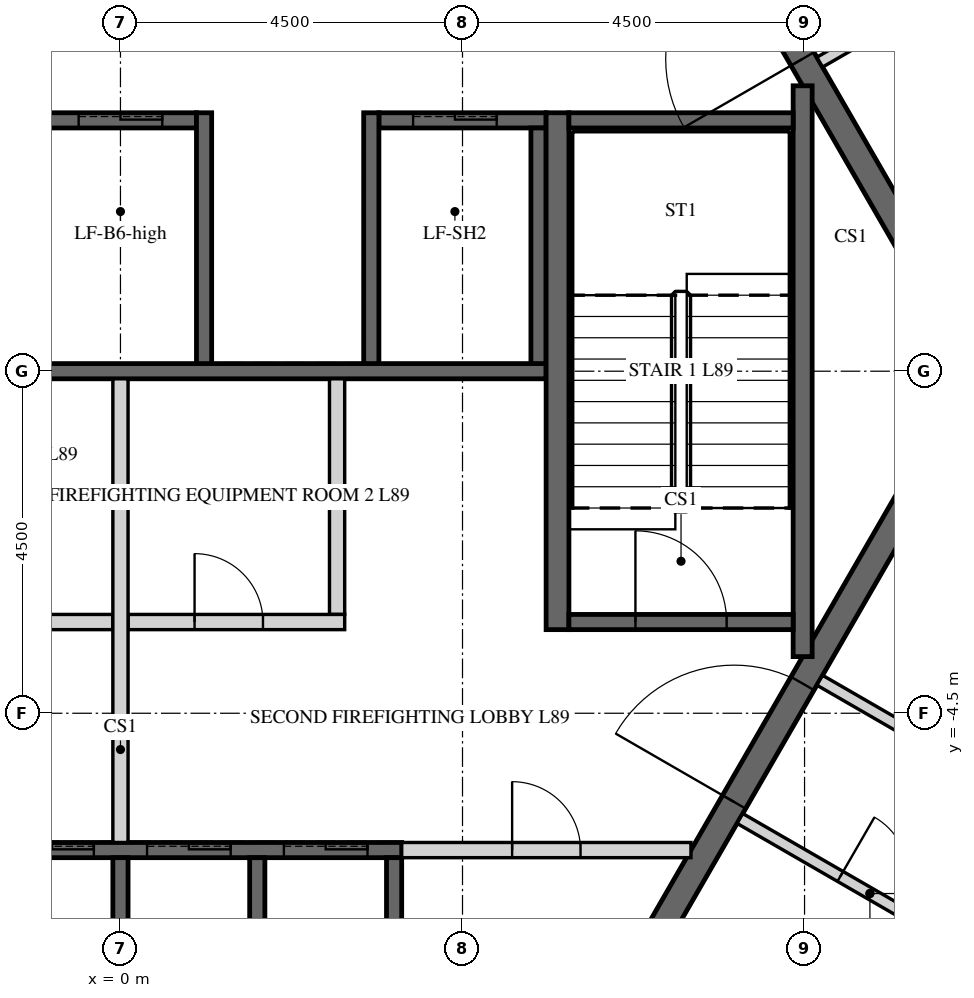
"""IFC4 building model, lengths in metres.
Left out: names, types, materials, properties, quantities, classifications, styles, units other than length and angle.
Written with IfcOpenShell. Run it as: python <this file> out.ifc"""

import sys

from ifc_helpers import new_model, si_unit, direction, frame, frame_2d, origin, place, context, subcontext, project, spatial, polyline, rectangle, outline, extrude, element, fill, save


model = new_model("IFC4")
c1 = context("Model", 3, precision=1e-05, world=origin(), true_north=direction((0.0, 1.0)))
c2 = subcontext(c1, "Body", "Model", "MODEL_VIEW")
j1 = project(units=[si_unit("LENGTHUNIT", "METRE"), si_unit("PLANEANGLEUNIT", "RADIAN")], contexts=[c1])
p1 = place(None, origin())
s1 = spatial("IfcSite", under=j1, at=p1, CompositionType="ELEMENT")
p2 = place(p1, origin())
s2 = spatial("IfcBuilding", under=s1, at=p2, CompositionType="ELEMENT")
p3 = place(p2, frame((0.0, 0.0, 369.0)))
s3 = spatial("IfcBuildingStorey", under=s2, at=p3, CompositionType="ELEMENT", Elevation=369.0)
p4 = place(p3, frame((5.673, -9.825, -0.15), z_axis=(0.0, 0.0, 1.0), x_axis=(0.499995046907, 0.866028263435, 0.0)))
e1 = element("IfcWall", 1, at=p4, inside=s3, PredefinedType="SHEAR", context=c2, shape_type="SweptSolid", body=[
    extrude(outline(polyline([(-0.101, -0.175), (11.446, -0.175), (11.244, 0.175), (0.101, 0.175), (-0.101, -0.175)])), origin(), (0.0, 0.0, 1.0), 3.9),
])
p5 = place(p4, frame((4.801, 0.0, 0.15)))
e2 = element("IfcOpeningElement", 2, at=p5, cuts=e1, PredefinedType="OPENING", context=c2, shape_type="SweptSolid", body=[
    extrude(rectangle(XDim=1.8, YDim=2.4, at=frame_2d((0.9, 1.2))), frame((0.0, 0.185, 0.0), z_axis=(0.0, -1.0, 0.0), x_axis=(1.0, 0.0, 0.0)), (0.0, 0.0, 1.0), 0.37),
])
p6 = place(p3, frame((11.345, 0.0, -0.15), z_axis=(0.0, 0.0, 1.0), x_axis=(-0.499995046907, 0.866028263435, 0.0)))
e3 = element("IfcWall", 3, at=p6, inside=s3, PredefinedType="SHEAR", context=c2, shape_type="SweptSolid", body=[
    extrude(outline(polyline([(-0.101, -0.175), (11.446, -0.175), (11.244, 0.175), (0.101, 0.175), (-0.101, -0.175)])), origin(), (0.0, 0.0, 1.0), 3.9),
])
p7 = place(p6, frame((4.744, 0.0, 0.15)))
e4 = element("IfcOpeningElement", 4, at=p7, cuts=e3, PredefinedType="OPENING", context=c2, shape_type="SweptSolid", body=[
    extrude(rectangle(XDim=1.8, YDim=2.4, at=frame_2d((0.9, 1.2))), frame((0.0, 0.185, 0.0), z_axis=(0.0, -1.0, 0.0), x_axis=(1.0, 0.0, 0.0)), (0.0, 0.0, 1.0), 0.37),
])
p8 = place(p3, frame((-5.6, 3.3, -0.25), z_axis=(0.0, 0.0, 1.0), x_axis=(1.0, 0.0, 0.0)))
e5 = element("IfcWall", 5, at=p8, inside=s3, PredefinedType="SHEAR", context=c2, shape_type="SweptSolid", body=[
    extrude(rectangle(XDim=6.6, YDim=0.2, at=frame_2d((3.3, 0.0))), origin(), (0.0, 0.0, 1.0), 3.9),
])
p9 = place(p8, frame((0.65, 0.0, 0.25)))
e6 = element("IfcOpeningElement", 6, at=p9, cuts=e5, PredefinedType="OPENING", context=c2, shape_type="SweptSolid", body=[
    extrude(rectangle(XDim=1.1, YDim=2.1, at=frame_2d((0.55, 1.05))), frame((0.0, 0.11, 0.0), z_axis=(0.0, -1.0, 0.0), x_axis=(1.0, 0.0, 0.0)), (0.0, 0.0, 1.0), 0.22),
])
p10 = place(p8, frame((2.85, 0.0, 0.25)))
e7 = element("IfcOpeningElement", 7, at=p10, cuts=e5, PredefinedType="OPENING", context=c2, shape_type="SweptSolid", body=[
    extrude(rectangle(XDim=1.1, YDim=2.1, at=frame_2d((0.55, 1.05))), frame((0.0, 0.11, 0.0), z_axis=(0.0, -1.0, 0.0), x_axis=(1.0, 0.0, 0.0)), (0.0, 0.0, 1.0), 0.22),
])
p11 = place(p8, frame((5.05, 0.0, 0.25)))
e8 = element("IfcOpeningElement", 8, at=p11, cuts=e5, PredefinedType="OPENING", context=c2, shape_type="SweptSolid", body=[
    extrude(rectangle(XDim=1.1, YDim=2.1, at=frame_2d((0.55, 1.05))), frame((0.0, 0.11, 0.0), z_axis=(0.0, -1.0, 0.0), x_axis=(1.0, 0.0, 0.0)), (0.0, 0.0, 1.0), 0.22),
])
p12 = place(p3, frame((3.4, 3.3, -0.25), z_axis=(0.0, 0.0, 1.0), x_axis=(1.0, 0.0, 0.0)))
e9 = element("IfcWall", 9, at=p12, inside=s3, PredefinedType="SHEAR", context=c2, shape_type="SweptSolid", body=[
    extrude(rectangle(XDim=2.2, YDim=0.2, at=frame_2d((1.1, 0.0))), origin(), (0.0, 0.0, 1.0), 3.9),
])
p13 = place(p12, frame((0.45, 0.0, 0.25)))
e10 = element("IfcOpeningElement", 10, at=p13, cuts=e9, PredefinedType="OPENING", context=c2, shape_type="SweptSolid", body=[
    extrude(rectangle(XDim=1.1, YDim=2.1, at=frame_2d((0.55, 1.05))), frame((0.0, 0.11, 0.0), z_axis=(0.0, -1.0, 0.0), x_axis=(1.0, 0.0, 0.0)), (0.0, 0.0, 1.0), 0.22),
])
p14 = place(p3, frame((-5.6, 0.0, -0.25), z_axis=(0.0, 0.0, 1.0), x_axis=(1.0, 0.0, 0.0)))
e11 = element("IfcWall", 11, at=p14, inside=s3, PredefinedType="SHEAR", context=c2, shape_type="SweptSolid", body=[
    extrude(rectangle(XDim=11.2, YDim=0.2, at=frame_2d((5.6, 0.0))), origin(), (0.0, 0.0, 1.0), 3.9),
])
for number, where, z_axis, x_axis in (
    (12, (1.1, 0.1, -0.25), (0.0, 0.0, 1.0), (0.0, 1.0, 0.0)),
    (13, (3.3, 0.1, -0.25), (0.0, 0.0, 1.0), (0.0, 1.0, 0.0)),
):
    element("IfcWall", number, at=place(p3, frame(where, z_axis=z_axis, x_axis=x_axis)), inside=s3, PredefinedType="SHEAR", context=c2, shape_type="SweptSolid", body=[
        extrude(rectangle(XDim=3.3, YDim=0.2, at=frame_2d((1.65, 0.0))), origin(), (0.0, 0.0, 1.0), 3.9),
    ])
p15 = place(p3, frame((5.5, 0.1, -0.25), z_axis=(0.0, 0.0, 1.0), x_axis=(0.0, 1.0, 0.0)))
e14 = element("IfcWall", 14, at=p15, inside=s3, PredefinedType="SHEAR", context=c2, shape_type="SweptSolid", body=[
    extrude(rectangle(XDim=3.1, YDim=0.2, at=frame_2d((1.55, 0.0))), origin(), (0.0, 0.0, 1.0), 3.9),
])
p16 = place(p3, frame((-5.5, -6.3, -0.25), z_axis=(0.0, 0.0, 1.0), x_axis=(1.0, 0.0, 0.0)))
e15 = element("IfcWall", 15, at=p16, inside=s3, PredefinedType="SHEAR", context=c2, shape_type="SweptSolid", body=[
    extrude(rectangle(XDim=9.2, YDim=0.2, at=frame_2d((4.6, 0.0))), origin(), (0.0, 0.0, 1.0), 3.9),
])
p17 = place(p16, frame((0.45, 0.0, 0.25)))
e16 = element("IfcOpeningElement", 16, at=p17, cuts=e15, PredefinedType="OPENING", context=c2, shape_type="SweptSolid", body=[
    extrude(rectangle(XDim=1.1, YDim=2.1, at=frame_2d((0.55, 1.05))), frame((0.0, 0.11, 0.0), z_axis=(0.0, -1.0, 0.0), x_axis=(1.0, 0.0, 0.0)), (0.0, 0.0, 1.0), 0.22),
])
p18 = place(p16, frame((2.25, 0.0, 0.25)))
e17 = element("IfcOpeningElement", 17, at=p18, cuts=e15, PredefinedType="OPENING", context=c2, shape_type="SweptSolid", body=[
    extrude(rectangle(XDim=1.1, YDim=2.1, at=frame_2d((0.55, 1.05))), frame((0.0, 0.11, 0.0), z_axis=(0.0, -1.0, 0.0), x_axis=(1.0, 0.0, 0.0)), (0.0, 0.0, 1.0), 0.22),
])
p19 = place(p16, frame((4.05, 0.0, 0.25)))
e18 = element("IfcOpeningElement", 18, at=p19, cuts=e15, PredefinedType="OPENING", context=c2, shape_type="SweptSolid", body=[
    extrude(rectangle(XDim=1.1, YDim=2.1, at=frame_2d((0.55, 1.05))), frame((0.0, 0.11, 0.0), z_axis=(0.0, -1.0, 0.0), x_axis=(1.0, 0.0, 0.0)), (0.0, 0.0, 1.0), 0.22),
])
p20 = place(p16, frame((5.85, 0.0, 0.25)))
e19 = element("IfcOpeningElement", 19, at=p20, cuts=e15, PredefinedType="OPENING", context=c2, shape_type="SweptSolid", body=[
    extrude(rectangle(XDim=1.1, YDim=2.1, at=frame_2d((0.55, 1.05))), frame((0.0, 0.11, 0.0), z_axis=(0.0, -1.0, 0.0), x_axis=(1.0, 0.0, 0.0)), (0.0, 0.0, 1.0), 0.22),
])
p21 = place(p16, frame((7.65, 0.0, 0.25)))
e20 = element("IfcOpeningElement", 20, at=p21, cuts=e15, PredefinedType="OPENING", context=c2, shape_type="SweptSolid", body=[
    extrude(rectangle(XDim=1.1, YDim=2.1, at=frame_2d((0.55, 1.05))), frame((0.0, 0.11, 0.0), z_axis=(0.0, -1.0, 0.0), x_axis=(1.0, 0.0, 0.0)), (0.0, 0.0, 1.0), 0.22),
])
for number, where, z_axis, x_axis in (
    (21, (0.0, -9.3, -0.25), (0.0, 0.0, 1.0), (0.0, 1.0, 0.0)),
    (22, (1.8, -9.3, -0.25), (0.0, 0.0, 1.0), (0.0, 1.0, 0.0)),
    (23, (3.6, -9.3, -0.25), (0.0, 0.0, 1.0), (0.0, 1.0, 0.0)),
):
    element("IfcWall", number, at=place(p3, frame(where, z_axis=z_axis, x_axis=x_axis)), inside=s3, PredefinedType="SHEAR", context=c2, shape_type="SweptSolid", body=[
        extrude(rectangle(XDim=2.9, YDim=0.2, at=frame_2d((1.45, 0.0))), origin(), (0.0, 0.0, 1.0), 3.9),
    ])
p22 = place(p3, frame((-5.6, -3.3, 0.0), z_axis=(0.0, 0.0, 1.0), x_axis=(1.0, 0.0, 0.0)))
e24 = element("IfcWall", 24, at=p22, inside=s3, PredefinedType="PARTITIONING", context=c2, shape_type="SweptSolid", body=[
    extrude(rectangle(XDim=5.5, YDim=0.2, at=frame_2d((2.75, 0.0))), origin(), (0.0, 0.0, 1.0), 3.65),
])
p23 = place(p22, frame((2.3, 0.0, 0.0)))
e25 = element("IfcOpeningElement", 25, at=p23, cuts=e24, PredefinedType="OPENING", context=c2, shape_type="SweptSolid", body=[
    extrude(rectangle(XDim=0.9, YDim=2.1, at=frame_2d((0.45, 1.05))), frame((0.0, 0.11, 0.0), z_axis=(0.0, -1.0, 0.0), x_axis=(1.0, 0.0, 0.0)), (0.0, 0.0, 1.0), 0.22),
])
p24 = place(p3, frame((0.1, -3.3, 0.0), z_axis=(0.0, 0.0, 1.0), x_axis=(1.0, 0.0, 0.0)))
e26 = element("IfcWall", 26, at=p24, inside=s3, PredefinedType="PARTITIONING", context=c2, shape_type="SweptSolid", body=[
    extrude(rectangle(XDim=2.85, YDim=0.2, at=frame_2d((1.425, 0.0))), origin(), (0.0, 0.0, 1.0), 3.65),
])
p25 = place(p24, frame((0.875, 0.0, 0.0)))
e27 = element("IfcOpeningElement", 27, at=p25, cuts=e26, PredefinedType="OPENING", context=c2, shape_type="SweptSolid", body=[
    extrude(rectangle(XDim=0.9, YDim=2.1, at=frame_2d((0.45, 1.05))), frame((0.0, 0.11, 0.0), z_axis=(0.0, -1.0, 0.0), x_axis=(1.0, 0.0, 0.0)), (0.0, 0.0, 1.0), 0.22),
])
p26 = place(p3, frame((2.85, -3.2, 0.0), z_axis=(0.0, 0.0, 1.0), x_axis=(0.0, 1.0, 0.0)))
e28 = element("IfcWall", 28, at=p26, inside=s3, PredefinedType="PARTITIONING", context=c2, shape_type="SweptSolid", body=[
    extrude(rectangle(XDim=3.1, YDim=0.2, at=frame_2d((1.55, 0.0))), origin(), (0.0, 0.0, 1.0), 3.65),
])
p27 = place(p3, frame((0.0, -6.2, 0.0), z_axis=(0.0, 0.0, 1.0), x_axis=(0.0, 1.0, 0.0)))
e29 = element("IfcWall", 29, at=p27, inside=s3, PredefinedType="PARTITIONING", context=c2, shape_type="SweptSolid", body=[
    extrude(rectangle(XDim=6.1, YDim=0.2, at=frame_2d((3.05, 0.0))), origin(), (0.0, 0.0, 1.0), 3.65),
])
p28 = place(p3, frame((3.7, -6.3, 0.0), z_axis=(0.0, 0.0, 1.0), x_axis=(1.0, 0.0, 0.0)))
e30 = element("IfcWall", 30, at=p28, inside=s3, PredefinedType="PARTITIONING", context=c2, shape_type="SweptSolid", body=[
    extrude(rectangle(XDim=3.806, YDim=0.2, at=frame_2d((1.903, 0.0))), origin(), (0.0, 0.0, 1.0), 3.65),
])
p29 = place(p28, frame((1.453, 0.0, 0.0)))
e31 = element("IfcOpeningElement", 31, at=p29, cuts=e30, PredefinedType="OPENING", context=c2, shape_type="SweptSolid", body=[
    extrude(rectangle(XDim=0.9, YDim=2.1, at=frame_2d((0.45, 1.05))), frame((0.0, 0.11, 0.0), z_axis=(0.0, -1.0, 0.0), x_axis=(1.0, 0.0, 0.0)), (0.0, 0.0, 1.0), 0.22),
])
p30 = place(p3, frame((5.75, -3.4, -0.25), z_axis=(0.0, 0.0, 1.0), x_axis=(0.0, 1.0, 0.0)))
e32 = element("IfcWall", 32, at=p30, inside=s3, PredefinedType="SHEAR", context=c2, shape_type="SweptSolid", body=[
    extrude(rectangle(XDim=6.8, YDim=0.3, at=frame_2d((3.4, 0.0))), origin(), (0.0, 0.0, 1.0), 3.9),
])
p31 = place(p3, frame((8.975, -3.755, -0.25), z_axis=(0.0, 0.0, 1.0), x_axis=(0.0, 1.0, 0.0)))
e33 = element("IfcWall", 33, at=p31, inside=s3, PredefinedType="SHEAR", context=c2, shape_type="SweptSolid", body=[
    extrude(rectangle(XDim=7.51, YDim=0.25, at=frame_2d((3.755, 0.0))), origin(), (0.0, 0.0, 1.0), 3.9),
])
p32 = place(p3, frame((5.9, 3.3, -0.25), z_axis=(0.0, 0.0, 1.0), x_axis=(1.0, 0.0, 0.0)))
e34 = element("IfcWall", 34, at=p32, inside=s3, PredefinedType="SHEAR", context=c2, shape_type="SweptSolid", body=[
    extrude(rectangle(XDim=2.95, YDim=0.2, at=frame_2d((1.475, 0.0))), origin(), (0.0, 0.0, 1.0), 3.9),
])
p33 = place(p3, frame((5.9, -3.3, -0.25), z_axis=(0.0, 0.0, 1.0), x_axis=(1.0, 0.0, 0.0)))
e35 = element("IfcWall", 35, at=p33, inside=s3, PredefinedType="SHEAR", context=c2, shape_type="SweptSolid", body=[
    extrude(rectangle(XDim=2.95, YDim=0.2, at=frame_2d((1.475, 0.0))), origin(), (0.0, 0.0, 1.0), 3.9),
])
p34 = place(p33, frame((0.875, 0.0, 0.25)))
e36 = element("IfcOpeningElement", 36, at=p34, cuts=e35, PredefinedType="OPENING", context=c2, shape_type="SweptSolid", body=[
    extrude(rectangle(XDim=1.2, YDim=2.4, at=frame_2d((0.6, 1.2))), frame((0.0, 0.11, 0.0), z_axis=(0.0, -1.0, 0.0), x_axis=(1.0, 0.0, 0.0)), (0.0, 0.0, 1.0), 0.22),
])
p35 = place(p3, frame((17.401, -1.21, 0.0), z_axis=(0.0, 0.0, 1.0), x_axis=(-0.559186729505, 0.829041736914, 0.0)))
e37 = element("IfcWall", 37, at=p35, inside=s3, PredefinedType="PARTITIONING", context=c2, shape_type="SweptSolid", body=[
    extrude(rectangle(XDim=15.243, YDim=0.15, at=frame_2d((7.621, 0.0))), origin(), (0.0, 0.0, 1.0), 2.47),
])
p36 = place(p35, frame((5.802, 0.0, 0.0)))
e38 = element("IfcOpeningElement", 38, at=p36, cuts=e37, PredefinedType="OPENING", context=c2, shape_type="SweptSolid", body=[
    extrude(rectangle(XDim=1.0, YDim=2.1, at=frame_2d((0.5, 1.05))), frame((0.0, 0.085, 0.0), z_axis=(0.0, -1.0, 0.0), x_axis=(1.0, 0.0, 0.0)), (0.0, 0.0, 1.0), 0.17),
])
p37 = place(p3, frame((9.2, 4.066, 0.0), z_axis=(0.0, 0.0, 1.0), x_axis=(0.866011447264, 0.500024172624, 0.0)))
e39 = element("IfcWall", 39, at=p37, inside=s3, PredefinedType="PARTITIONING", context=c2, shape_type="SweptSolid", body=[
    extrude(rectangle(XDim=2.055, YDim=0.15, at=frame_2d((1.027, 0.0))), origin(), (0.0, 0.0, 1.0), 2.47),
])
p38 = place(p3, frame((12.555, -6.003, 0.0), z_axis=(0.0, 0.0, 1.0), x_axis=(-0.866016658288, 0.500015147339, 0.0)))
e40 = element("IfcWall", 40, at=p38, inside=s3, PredefinedType="PARTITIONING", context=c2, shape_type="SweptSolid", body=[
    extrude(rectangle(XDim=3.875, YDim=0.15, at=frame_2d((1.938, 0.0))), origin(), (0.0, 0.0, 1.0), 2.47),
])
p39 = place(p3, frame((8.15, -5.884, 0.0), z_axis=(0.0, 0.0, 1.0), x_axis=(0.866020906874, -0.500007788796, 0.0)))
e41 = element("IfcWall", 41, at=p39, inside=s3, PredefinedType="PARTITIONING", context=c2, shape_type="SweptSolid", body=[
    extrude(rectangle(XDim=3.95, YDim=0.15, at=frame_2d((1.975, 0.0))), origin(), (0.0, 0.0, 1.0), 2.47),
])
p40 = place(p39, frame((1.525, 0.0, 0.0)))
e42 = element("IfcOpeningElement", 42, at=p40, cuts=e41, PredefinedType="OPENING", context=c2, shape_type="SweptSolid", body=[
    extrude(rectangle(XDim=0.9, YDim=2.1, at=frame_2d((0.45, 1.05))), frame((0.0, 0.085, 0.0), z_axis=(0.0, -1.0, 0.0), x_axis=(1.0, 0.0, 0.0)), (0.0, 0.0, 1.0), 0.17),
])
p41 = place(p7, origin())
e43 = element("IfcDoor", 43, at=p41, inside=s3, OperationType="DOUBLE_DOOR_SINGLE_SWING", PredefinedType="DOOR", context=c2, shape_type="SweptSolid", body=[
    extrude(rectangle(XDim=1.8, YDim=2.4, at=frame_2d((0.9, 1.2))), frame((0.0, 0.025, 0.0), z_axis=(0.0, -1.0, 0.0), x_axis=(1.0, 0.0, 0.0)), (0.0, 0.0, 1.0), 0.05),
])
fill(e4, e43)
p42 = place(p5, origin())
e44 = element("IfcDoor", 44, at=p42, inside=s3, OperationType="DOUBLE_DOOR_SINGLE_SWING", PredefinedType="DOOR", context=c2, shape_type="SweptSolid", body=[
    extrude(rectangle(XDim=1.8, YDim=2.4, at=frame_2d((0.9, 1.2))), frame((0.0, 0.025, 0.0), z_axis=(0.0, -1.0, 0.0), x_axis=(1.0, 0.0, 0.0)), (0.0, 0.0, 1.0), 0.05),
])
fill(e2, e44)
p43 = place(p25, origin())
e45 = element("IfcDoor", 45, at=p43, inside=s3, OperationType="SINGLE_SWING_LEFT", PredefinedType="DOOR", context=c2, shape_type="SweptSolid", body=[
    extrude(rectangle(XDim=0.9, YDim=2.1, at=frame_2d((0.45, 1.05))), frame((0.0, 0.025, 0.0), z_axis=(0.0, -1.0, 0.0), x_axis=(1.0, 0.0, 0.0)), (0.0, 0.0, 1.0), 0.05),
])
fill(e27, e45)
p44 = place(p29, origin())
e46 = element("IfcDoor", 46, at=p44, inside=s3, OperationType="SINGLE_SWING_LEFT", PredefinedType="DOOR", context=c2, shape_type="SweptSolid", body=[
    extrude(rectangle(XDim=0.9, YDim=2.1, at=frame_2d((0.45, 1.05))), frame((0.0, 0.025, 0.0), z_axis=(0.0, -1.0, 0.0), x_axis=(1.0, 0.0, 0.0)), (0.0, 0.0, 1.0), 0.05),
])
fill(e31, e46)
p45 = place(p34, origin())
e47 = element("IfcDoor", 47, at=p45, inside=s3, OperationType="SINGLE_SWING_LEFT", PredefinedType="DOOR", context=c2, shape_type="SweptSolid", body=[
    extrude(rectangle(XDim=1.2, YDim=2.4, at=frame_2d((0.6, 1.2))), frame((0.0, 0.025, 0.0), z_axis=(0.0, -1.0, 0.0), x_axis=(1.0, 0.0, 0.0)), (0.0, 0.0, 1.0), 0.05),
])
fill(e36, e47)
p46 = place(p11, origin())
e48 = element("IfcDoor", 48, at=p46, inside=s3, OperationType="SLIDING_TO_LEFT", PredefinedType="DOOR", context=c2, shape_type="SweptSolid", body=[
    extrude(rectangle(XDim=1.1, YDim=2.1, at=frame_2d((0.55, 1.05))), frame((0.0, 0.025, 0.0), z_axis=(0.0, -1.0, 0.0), x_axis=(1.0, 0.0, 0.0)), (0.0, 0.0, 1.0), 0.05),
])
fill(e8, e48)
p47 = place(p13, origin())
e49 = element("IfcDoor", 49, at=p47, inside=s3, OperationType="SLIDING_TO_LEFT", PredefinedType="DOOR", context=c2, shape_type="SweptSolid", body=[
    extrude(rectangle(XDim=1.1, YDim=2.1, at=frame_2d((0.55, 1.05))), frame((0.0, 0.025, 0.0), z_axis=(0.0, -1.0, 0.0), x_axis=(1.0, 0.0, 0.0)), (0.0, 0.0, 1.0), 0.05),
])
fill(e10, e49)
p48 = place(p19, origin())
e50 = element("IfcDoor", 50, at=p48, inside=s3, OperationType="SLIDING_TO_LEFT", PredefinedType="DOOR", context=c2, shape_type="SweptSolid", body=[
    extrude(rectangle(XDim=1.1, YDim=2.1, at=frame_2d((0.55, 1.05))), frame((0.0, 0.025, 0.0), z_axis=(0.0, -1.0, 0.0), x_axis=(1.0, 0.0, 0.0)), (0.0, 0.0, 1.0), 0.05),
])
fill(e18, e50)
p49 = place(p20, origin())
e51 = element("IfcDoor", 51, at=p49, inside=s3, OperationType="SLIDING_TO_LEFT", PredefinedType="DOOR", context=c2, shape_type="SweptSolid", body=[
    extrude(rectangle(XDim=1.1, YDim=2.1, at=frame_2d((0.55, 1.05))), frame((0.0, 0.025, 0.0), z_axis=(0.0, -1.0, 0.0), x_axis=(1.0, 0.0, 0.0)), (0.0, 0.0, 1.0), 0.05),
])
fill(e19, e51)
p50 = place(p21, origin())
e52 = element("IfcDoor", 52, at=p50, inside=s3, OperationType="SLIDING_TO_LEFT", PredefinedType="DOOR", context=c2, shape_type="SweptSolid", body=[
    extrude(rectangle(XDim=1.1, YDim=2.1, at=frame_2d((0.55, 1.05))), frame((0.0, 0.025, 0.0), z_axis=(0.0, -1.0, 0.0), x_axis=(1.0, 0.0, 0.0)), (0.0, 0.0, 1.0), 0.05),
])
fill(e20, e52)
p51 = place(p40, origin())
e53 = element("IfcDoor", 53, at=p51, inside=s3, OperationType="SINGLE_SWING_LEFT", PredefinedType="DOOR", context=c2, shape_type="SweptSolid", body=[
    extrude(rectangle(XDim=0.9, YDim=2.1, at=frame_2d((0.45, 1.05))), frame((0.0, 0.025, 0.0), z_axis=(0.0, -1.0, 0.0), x_axis=(1.0, 0.0, 0.0)), (0.0, 0.0, 1.0), 0.05),
])
fill(e42, e53)
save(model, sys.argv[1])
